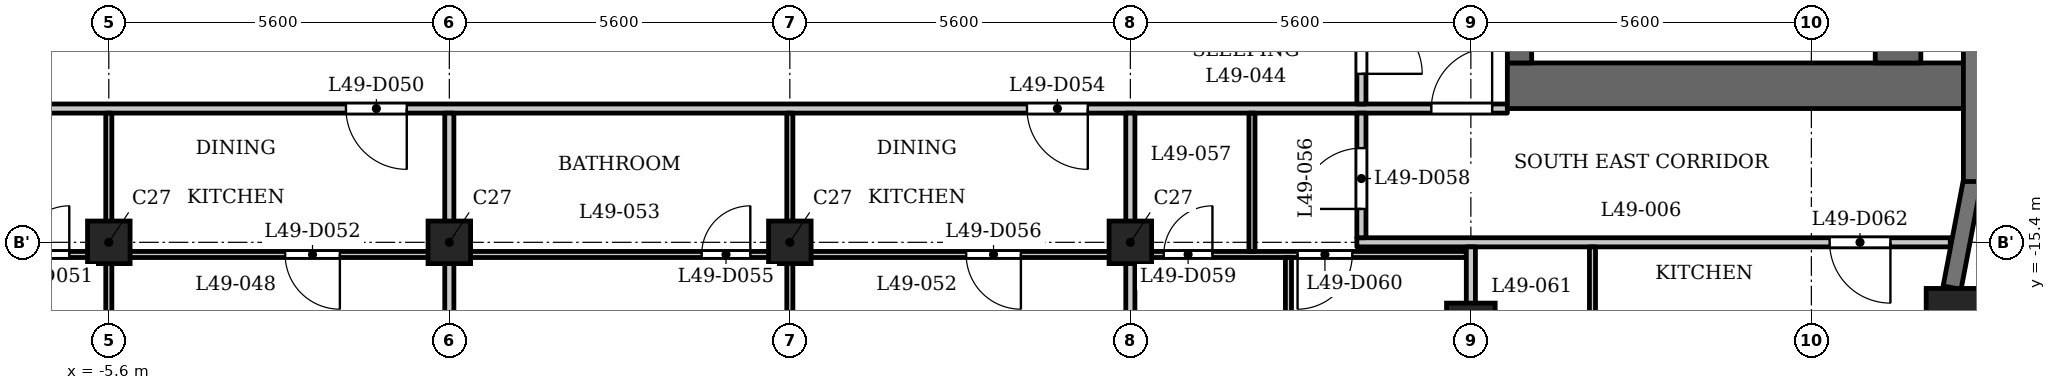
"""IFC4 building model, lengths in metres.
Left out: names, types, materials, properties, quantities, classifications, styles, units other than length and angle.
Written with IfcOpenShell. Run it as: python <this file> out.ifc"""

import sys

from ifc_helpers import new_model, si_unit, direction, frame, frame_2d, origin, origin_2d, place, context, subcontext, project, spatial, rectangle, extrude, element, fill, save


model = new_model("IFC4")
c1 = context("Model", 3, precision=1e-05, world=origin(), true_north=direction((0.0, 1.0)))
c2 = subcontext(c1, "Body", "Model", "MODEL_VIEW")
j1 = project(units=[si_unit("LENGTHUNIT", "METRE"), si_unit("PLANEANGLEUNIT", "RADIAN")], contexts=[c1])
p1 = place(None, origin())
s1 = spatial("IfcSite", under=j1, at=p1, CompositionType="ELEMENT")
p2 = place(p1, origin())
s2 = spatial("IfcBuilding", under=s1, at=p2, CompositionType="ELEMENT")
p3 = place(p2, frame((0.0, 0.0, 192.4)))
s3 = spatial("IfcBuildingStorey", under=s2, at=p3, CompositionType="ELEMENT", Elevation=192.4)
p4 = place(p3, frame((24.738, -16.609, 0.0), z_axis=(0.0, 0.0, 1.0), x_axis=(1.0, 0.0, 0.0)))
e1 = element("IfcColumn", 1, at=p4, inside=s3, PredefinedType="COLUMN", context=c2, shape_type="SweptSolid", body=[
    extrude(rectangle(XDim=0.9, YDim=0.9, at=origin_2d()), origin(), (0.0, 0.0, 1.0), 3.5),
])
p5 = place(p3, frame((16.8, -16.8, 0.0), z_axis=(0.0, 0.0, 1.0), x_axis=(1.0, 0.0, 0.0)))
e2 = element("IfcColumn", 2, at=p5, inside=s3, PredefinedType="COLUMN", context=c2, shape_type="SweptSolid", body=[
    extrude(rectangle(XDim=0.8, YDim=0.8, at=origin_2d()), origin(), (0.0, 0.0, 1.0), 3.5),
])
for number, where, z_axis, x_axis in (
    (3, (-5.6, -15.4, 0.0), (0.0, 0.0, 1.0), (1.0, 0.0, 0.0)),
    (4, (0.0, -15.4, 0.0), (0.0, 0.0, 1.0), (1.0, 0.0, 0.0)),
    (5, (5.6, -15.4, 0.0), (0.0, 0.0, 1.0), (1.0, 0.0, 0.0)),
    (6, (11.2, -15.4, 0.0), (0.0, 0.0, 1.0), (1.0, 0.0, 0.0)),
):
    element("IfcColumn", number, at=place(p3, frame(where, z_axis=z_axis, x_axis=x_axis)), inside=s3, PredefinedType="COLUMN", context=c2, shape_type="SweptSolid", body=[
        extrude(rectangle(XDim=0.7, YDim=0.7, at=origin_2d()), origin(), (0.0, 0.0, 1.0), 3.5),
    ])
p6 = place(p3, frame((24.714, -16.146, 0.0), z_axis=(0.0, 0.0, 1.0), x_axis=(0.187348135549, 0.982293579388, 0.0)))
e7 = element("IfcWall", 7, at=p6, inside=s3, PredefinedType="SOLIDWALL", context=c2, shape_type="SweptSolid", body=[
    extrude(rectangle(XDim=1.806, YDim=0.3, at=frame_2d((0.903, 0.0))), origin(), (0.0, 0.0, 1.0), 2.5),
])
p7 = place(p3, frame((25.05, -14.4, 0.0), z_axis=(0.0, 0.0, 1.0), x_axis=(0.0, 1.0, 0.0)))
e8 = element("IfcWall", 8, at=p7, inside=s3, PredefinedType="SOLIDWALL", context=c2, shape_type="SweptSolid", body=[
    extrude(rectangle(XDim=2.75, YDim=0.3, at=frame_2d((1.375, 0.0))), origin(), (0.0, 0.0, 1.0), 2.5),
])
p8 = place(p3, frame((17.4, -12.825, 0.0), z_axis=(0.0, 0.0, 1.0), x_axis=(1.0, 0.0, 0.0)))
e9 = element("IfcWall", 9, at=p8, inside=s3, PredefinedType="SHEAR", context=c2, shape_type="SweptSolid", body=[
    extrude(rectangle(XDim=7.6, YDim=0.75, at=frame_2d((3.8, 0.0))), origin(), (0.0, 0.0, 1.0), 3.2),
])
p9 = place(p3, frame((17.6, -12.45, 0.0), z_axis=(0.0, 0.0, 1.0), x_axis=(0.0, 1.0, 0.0)))
e10 = element("IfcWall", 10, at=p9, inside=s3, PredefinedType="SHEAR", context=c2, shape_type="SweptSolid", body=[
    extrude(rectangle(XDim=24.9, YDim=0.4, at=frame_2d((12.45, 0.0))), origin(), (0.0, 0.0, 1.0), 3.2),
])
p10 = place(p9, frame((6.325, 0.0, 0.0)))
e11 = element("IfcOpeningElement", 11, at=p10, cuts=e10, PredefinedType="OPENING", context=c2, shape_type="SweptSolid", body=[
    extrude(rectangle(XDim=0.9, YDim=2.1, at=frame_2d((0.45, 1.05))), frame((0.0, 0.21, 0.0), z_axis=(0.0, -1.0, 0.0), x_axis=(1.0, 0.0, 0.0)), (0.0, 0.0, 1.0), 0.42),
])
p11 = place(p9, frame((9.925, 0.0, 0.0)))
e12 = element("IfcOpeningElement", 12, at=p11, cuts=e10, PredefinedType="OPENING", context=c2, shape_type="SweptSolid", body=[
    extrude(rectangle(XDim=0.9, YDim=2.1, at=frame_2d((0.45, 1.05))), frame((0.0, 0.21, 0.0), z_axis=(0.0, -1.0, 0.0), x_axis=(1.0, 0.0, 0.0)), (0.0, 0.0, 1.0), 0.42),
])
p12 = place(p9, frame((15.6, 0.0, 0.0)))
e13 = element("IfcOpeningElement", 13, at=p12, cuts=e10, PredefinedType="OPENING", context=c2, shape_type="SweptSolid", body=[
    extrude(rectangle(XDim=1.1, YDim=2.1, at=frame_2d((0.55, 1.05))), frame((0.0, 0.21, 0.0), z_axis=(0.0, -1.0, 0.0), x_axis=(1.0, 0.0, 0.0)), (0.0, 0.0, 1.0), 0.42),
])
p13 = place(p9, frame((18.0, 0.0, 0.0)))
e14 = element("IfcOpeningElement", 14, at=p13, cuts=e10, PredefinedType="OPENING", context=c2, shape_type="SweptSolid", body=[
    extrude(rectangle(XDim=1.1, YDim=2.1, at=frame_2d((0.55, 1.05))), frame((0.0, 0.21, 0.0), z_axis=(0.0, -1.0, 0.0), x_axis=(1.0, 0.0, 0.0)), (0.0, 0.0, 1.0), 0.42),
])
p14 = place(p9, frame((23.025, 0.0, 0.0)))
e15 = element("IfcOpeningElement", 15, at=p14, cuts=e10, PredefinedType="OPENING", context=c2, shape_type="SweptSolid", body=[
    extrude(rectangle(XDim=1.1, YDim=2.1, at=frame_2d((0.55, 1.05))), frame((0.0, 0.21, 0.0), z_axis=(0.0, -1.0, 0.0), x_axis=(1.0, 0.0, 0.0)), (0.0, 0.0, 1.0), 0.42),
])
p15 = place(p9, frame((0.775, 0.0, 0.0)))
e16 = element("IfcOpeningElement", 16, at=p15, cuts=e10, PredefinedType="OPENING", context=c2, shape_type="SweptSolid", body=[
    extrude(rectangle(XDim=1.1, YDim=2.1, at=frame_2d((0.55, 1.05))), frame((0.0, 0.21, 0.0), z_axis=(0.0, -1.0, 0.0), x_axis=(1.0, 0.0, 0.0)), (0.0, 0.0, 1.0), 0.42),
])
p16 = place(p9, frame((12.925, 0.0, 0.0)))
e17 = element("IfcOpeningElement", 17, at=p16, cuts=e10, PredefinedType="OPENING", context=c2, shape_type="SweptSolid", body=[
    extrude(rectangle(XDim=1.8, YDim=2.1, at=frame_2d((0.9, 1.05))), frame((0.0, 0.21, 0.0), z_axis=(0.0, -1.0, 0.0), x_axis=(1.0, 0.0, 0.0)), (0.0, 0.0, 1.0), 0.42),
])
p17 = place(p3, frame((23.825, -12.45, 0.0), z_axis=(0.0, 0.0, 1.0), x_axis=(0.0, 1.0, 0.0)))
e18 = element("IfcWall", 18, at=p17, inside=s3, PredefinedType="SHEAR", context=c2, shape_type="SweptSolid", body=[
    extrude(rectangle(XDim=24.9, YDim=0.75, at=frame_2d((12.45, 0.0))), origin(), (0.0, 0.0, 1.0), 3.2),
])
p18 = place(p3, frame((-16.725, -15.6, 0.0), z_axis=(0.0, 0.0, 1.0), x_axis=(1.0, 0.0, 0.0)))
e19 = element("IfcWall", 19, at=p18, inside=s3, PredefinedType="PARTITIONING", context=c2, shape_type="SweptSolid", body=[
    extrude(rectangle(XDim=33.45, YDim=0.1, at=frame_2d((16.725, 0.0))), origin(), (0.0, 0.0, 1.0), 3.2),
])
p19 = place(p18, frame((4.075, 0.0, 0.0)))
e20 = element("IfcOpeningElement", 20, at=p19, cuts=e19, PredefinedType="OPENING", context=c2, shape_type="SweptSolid", body=[
    extrude(rectangle(XDim=0.8, YDim=2.1, at=frame_2d((0.4, 1.05))), frame((0.0, 0.06, 0.0), z_axis=(0.0, -1.0, 0.0), x_axis=(1.0, 0.0, 0.0)), (0.0, 0.0, 1.0), 0.12),
])
p20 = place(p18, frame((1.825, 0.0, 0.0)))
e21 = element("IfcOpeningElement", 21, at=p20, cuts=e19, PredefinedType="OPENING", context=c2, shape_type="SweptSolid", body=[
    extrude(rectangle(XDim=0.9, YDim=2.1, at=frame_2d((0.45, 1.05))), frame((0.0, 0.06, 0.0), z_axis=(0.0, -1.0, 0.0), x_axis=(1.0, 0.0, 0.0)), (0.0, 0.0, 1.0), 0.12),
])
p21 = place(p18, frame((9.675, 0.0, 0.0)))
e22 = element("IfcOpeningElement", 22, at=p21, cuts=e19, PredefinedType="OPENING", context=c2, shape_type="SweptSolid", body=[
    extrude(rectangle(XDim=0.8, YDim=2.1, at=frame_2d((0.4, 1.05))), frame((0.0, 0.06, 0.0), z_axis=(0.0, -1.0, 0.0), x_axis=(1.0, 0.0, 0.0)), (0.0, 0.0, 1.0), 0.12),
])
p22 = place(p18, frame((14.025, 0.0, 0.0)))
e23 = element("IfcOpeningElement", 23, at=p22, cuts=e19, PredefinedType="OPENING", context=c2, shape_type="SweptSolid", body=[
    extrude(rectangle(XDim=0.9, YDim=2.1, at=frame_2d((0.45, 1.05))), frame((0.0, 0.06, 0.0), z_axis=(0.0, -1.0, 0.0), x_axis=(1.0, 0.0, 0.0)), (0.0, 0.0, 1.0), 0.12),
])
p23 = place(p18, frame((20.875, 0.0, 0.0)))
e24 = element("IfcOpeningElement", 24, at=p23, cuts=e19, PredefinedType="OPENING", context=c2, shape_type="SweptSolid", body=[
    extrude(rectangle(XDim=0.8, YDim=2.1, at=frame_2d((0.4, 1.05))), frame((0.0, 0.06, 0.0), z_axis=(0.0, -1.0, 0.0), x_axis=(1.0, 0.0, 0.0)), (0.0, 0.0, 1.0), 0.12),
])
p24 = place(p18, frame((25.225, 0.0, 0.0)))
e25 = element("IfcOpeningElement", 25, at=p24, cuts=e19, PredefinedType="OPENING", context=c2, shape_type="SweptSolid", body=[
    extrude(rectangle(XDim=0.9, YDim=2.1, at=frame_2d((0.45, 1.05))), frame((0.0, 0.06, 0.0), z_axis=(0.0, -1.0, 0.0), x_axis=(1.0, 0.0, 0.0)), (0.0, 0.0, 1.0), 0.12),
])
p25 = place(p18, frame((28.475, 0.0, 0.0)))
e26 = element("IfcOpeningElement", 26, at=p25, cuts=e19, PredefinedType="OPENING", context=c2, shape_type="SweptSolid", body=[
    extrude(rectangle(XDim=0.8, YDim=2.1, at=frame_2d((0.4, 1.05))), frame((0.0, 0.06, 0.0), z_axis=(0.0, -1.0, 0.0), x_axis=(1.0, 0.0, 0.0)), (0.0, 0.0, 1.0), 0.12),
])
p26 = place(p18, frame((30.675, 0.0, 0.0)))
e27 = element("IfcOpeningElement", 27, at=p26, cuts=e19, PredefinedType="OPENING", context=c2, shape_type="SweptSolid", body=[
    extrude(rectangle(XDim=0.9, YDim=2.1, at=frame_2d((0.45, 1.05))), frame((0.0, 0.06, 0.0), z_axis=(0.0, -1.0, 0.0), x_axis=(1.0, 0.0, 0.0)), (0.0, 0.0, 1.0), 0.12),
])
p27 = place(p3, frame((14.925, -15.4, 0.0), z_axis=(0.0, 0.0, 1.0), x_axis=(1.0, 0.0, 0.0)))
e28 = element("IfcWall", 28, at=p27, inside=s3, PredefinedType="PARTITIONING", context=c2, shape_type="SweptSolid", body=[
    extrude(rectangle(XDim=9.759, YDim=0.15, at=frame_2d((4.879, 0.0))), origin(), (0.0, 0.0, 1.0), 3.2),
])
p28 = place(p27, frame((7.775, 0.0, 0.0)))
e29 = element("IfcOpeningElement", 29, at=p28, cuts=e28, PredefinedType="OPENING", context=c2, shape_type="SweptSolid", body=[
    extrude(rectangle(XDim=1.0, YDim=2.1, at=frame_2d((0.5, 1.05))), frame((0.0, 0.085, 0.0), z_axis=(0.0, -1.0, 0.0), x_axis=(1.0, 0.0, 0.0)), (0.0, 0.0, 1.0), 0.17),
])
p29 = place(p3, frame((-17.4, -13.2, 0.0), z_axis=(0.0, 0.0, 1.0), x_axis=(1.0, 0.0, 0.0)))
e30 = element("IfcWall", 30, at=p29, inside=s3, PredefinedType="PARTITIONING", context=c2, shape_type="SweptSolid", body=[
    extrude(rectangle(XDim=34.8, YDim=0.15, at=frame_2d((17.4, 0.0))), origin(), (0.0, 0.0, 1.0), 3.2),
])
p30 = place(p29, frame((0.15, 0.0, 0.0)))
e31 = element("IfcOpeningElement", 31, at=p30, cuts=e30, PredefinedType="OPENING", context=c2, shape_type="SweptSolid", body=[
    extrude(rectangle(XDim=1.0, YDim=2.1, at=frame_2d((0.5, 1.05))), frame((0.0, 0.085, 0.0), z_axis=(0.0, -1.0, 0.0), x_axis=(1.0, 0.0, 0.0)), (0.0, 0.0, 1.0), 0.17),
])
p31 = place(p29, frame((33.55, 0.0, 0.0)))
e32 = element("IfcOpeningElement", 32, at=p31, cuts=e30, PredefinedType="OPENING", context=c2, shape_type="SweptSolid", body=[
    extrude(rectangle(XDim=1.0, YDim=2.1, at=frame_2d((0.5, 1.05))), frame((0.0, 0.085, 0.0), z_axis=(0.0, -1.0, 0.0), x_axis=(1.0, 0.0, 0.0)), (0.0, 0.0, 1.0), 0.17),
])
p32 = place(p29, frame((15.7, 0.0, 0.0)))
e33 = element("IfcOpeningElement", 33, at=p32, cuts=e30, PredefinedType="OPENING", context=c2, shape_type="SweptSolid", body=[
    extrude(rectangle(XDim=1.0, YDim=2.1, at=frame_2d((0.5, 1.05))), frame((0.0, 0.085, 0.0), z_axis=(0.0, -1.0, 0.0), x_axis=(1.0, 0.0, 0.0)), (0.0, 0.0, 1.0), 0.17),
])
p33 = place(p29, frame((26.9, 0.0, 0.0)))
e34 = element("IfcOpeningElement", 34, at=p33, cuts=e30, PredefinedType="OPENING", context=c2, shape_type="SweptSolid", body=[
    extrude(rectangle(XDim=1.0, YDim=2.1, at=frame_2d((0.5, 1.05))), frame((0.0, 0.085, 0.0), z_axis=(0.0, -1.0, 0.0), x_axis=(1.0, 0.0, 0.0)), (0.0, 0.0, 1.0), 0.17),
])
p34 = place(p3, frame((-5.6, -22.08, 0.0), z_axis=(0.0, 0.0, 1.0), x_axis=(0.0, 1.0, 0.0)))
e35 = element("IfcWall", 35, at=p34, inside=s3, PredefinedType="PARTITIONING", context=c2, shape_type="SweptSolid", body=[
    extrude(rectangle(XDim=6.43, YDim=0.1, at=frame_2d((3.215, 0.0))), origin(), (0.0, 0.0, 1.0), 3.2),
])
p35 = place(p34, frame((4.18, 0.0, 0.0)))
e36 = element("IfcOpeningElement", 36, at=p35, cuts=e35, PredefinedType="OPENING", context=c2, shape_type="SweptSolid", body=[
    extrude(rectangle(XDim=0.9, YDim=2.1, at=frame_2d((0.45, 1.05))), frame((0.0, 0.06, 0.0), z_axis=(0.0, -1.0, 0.0), x_axis=(1.0, 0.0, 0.0)), (0.0, 0.0, 1.0), 0.12),
])
p36 = place(p3, frame((-5.6, -15.55, 0.0), z_axis=(0.0, 0.0, 1.0), x_axis=(0.0, 1.0, 0.0)))
e37 = element("IfcWall", 37, at=p36, inside=s3, PredefinedType="PARTITIONING", context=c2, shape_type="SweptSolid", body=[
    extrude(rectangle(XDim=2.275, YDim=0.1, at=frame_2d((1.138, 0.0))), origin(), (0.0, 0.0, 1.0), 3.2),
])
p37 = place(p3, frame((0.0, -22.08, 0.0), z_axis=(0.0, 0.0, 1.0), x_axis=(0.0, 1.0, 0.0)))
e38 = element("IfcWall", 38, at=p37, inside=s3, PredefinedType="PARTITIONING", context=c2, shape_type="SweptSolid", body=[
    extrude(rectangle(XDim=6.43, YDim=0.15, at=frame_2d((3.215, 0.0))), origin(), (0.0, 0.0, 1.0), 3.2),
])
p38 = place(p3, frame((0.0, -15.55, 0.0), z_axis=(0.0, 0.0, 1.0), x_axis=(0.0, 1.0, 0.0)))
e39 = element("IfcWall", 39, at=p38, inside=s3, PredefinedType="PARTITIONING", context=c2, shape_type="SweptSolid", body=[
    extrude(rectangle(XDim=2.275, YDim=0.15, at=frame_2d((1.138, 0.0))), origin(), (0.0, 0.0, 1.0), 3.2),
])
p39 = place(p3, frame((5.6, -22.08, 0.0), z_axis=(0.0, 0.0, 1.0), x_axis=(0.0, 1.0, 0.0)))
e40 = element("IfcWall", 40, at=p39, inside=s3, PredefinedType="PARTITIONING", context=c2, shape_type="SweptSolid", body=[
    extrude(rectangle(XDim=6.43, YDim=0.1, at=frame_2d((3.215, 0.0))), origin(), (0.0, 0.0, 1.0), 3.2),
])
p40 = place(p39, frame((4.18, 0.0, 0.0)))
e41 = element("IfcOpeningElement", 41, at=p40, cuts=e40, PredefinedType="OPENING", context=c2, shape_type="SweptSolid", body=[
    extrude(rectangle(XDim=0.9, YDim=2.1, at=frame_2d((0.45, 1.05))), frame((0.0, 0.06, 0.0), z_axis=(0.0, -1.0, 0.0), x_axis=(1.0, 0.0, 0.0)), (0.0, 0.0, 1.0), 0.12),
])
p41 = place(p3, frame((5.6, -15.55, 0.0), z_axis=(0.0, 0.0, 1.0), x_axis=(0.0, 1.0, 0.0)))
e42 = element("IfcWall", 42, at=p41, inside=s3, PredefinedType="PARTITIONING", context=c2, shape_type="SweptSolid", body=[
    extrude(rectangle(XDim=2.275, YDim=0.1, at=frame_2d((1.138, 0.0))), origin(), (0.0, 0.0, 1.0), 3.2),
])
p42 = place(p3, frame((11.2, -22.08, 0.0), z_axis=(0.0, 0.0, 1.0), x_axis=(0.0, 1.0, 0.0)))
e43 = element("IfcWall", 43, at=p42, inside=s3, PredefinedType="PARTITIONING", context=c2, shape_type="SweptSolid", body=[
    extrude(rectangle(XDim=6.43, YDim=0.15, at=frame_2d((3.215, 0.0))), origin(), (0.0, 0.0, 1.0), 3.2),
])
p43 = place(p3, frame((11.2, -15.55, 0.0), z_axis=(0.0, 0.0, 1.0), x_axis=(0.0, 1.0, 0.0)))
e44 = element("IfcWall", 44, at=p43, inside=s3, PredefinedType="PARTITIONING", context=c2, shape_type="SweptSolid", body=[
    extrude(rectangle(XDim=2.275, YDim=0.15, at=frame_2d((1.138, 0.0))), origin(), (0.0, 0.0, 1.0), 3.2),
])
p44 = place(p3, frame((13.2, -15.55, 0.0), z_axis=(0.0, 0.0, 1.0), x_axis=(0.0, 1.0, 0.0)))
e45 = element("IfcWall", 45, at=p44, inside=s3, PredefinedType="PARTITIONING", context=c2, shape_type="SweptSolid", body=[
    extrude(rectangle(XDim=2.275, YDim=0.1, at=frame_2d((1.138, 0.0))), origin(), (0.0, 0.0, 1.0), 3.2),
])
p45 = place(p3, frame((13.8, -22.83, 0.0), z_axis=(0.0, 0.0, 1.0), x_axis=(0.0, 1.0, 0.0)))
e46 = element("IfcWall", 46, at=p45, inside=s3, PredefinedType="PARTITIONING", context=c2, shape_type="SweptSolid", body=[
    extrude(rectangle(XDim=7.18, YDim=0.1, at=frame_2d((3.59, 0.0))), origin(), (0.0, 0.0, 1.0), 3.2),
])
p46 = place(p45, frame((5.18, 0.0, 0.0)))
e47 = element("IfcOpeningElement", 47, at=p46, cuts=e46, PredefinedType="OPENING", context=c2, shape_type="SweptSolid", body=[
    extrude(rectangle(XDim=0.9, YDim=2.1, at=frame_2d((0.45, 1.05))), frame((0.0, 0.06, 0.0), z_axis=(0.0, -1.0, 0.0), x_axis=(1.0, 0.0, 0.0)), (0.0, 0.0, 1.0), 0.12),
])
p47 = place(p3, frame((15.0, -15.325, 0.0), z_axis=(0.0, 0.0, 1.0), x_axis=(0.0, 1.0, 0.0)))
e48 = element("IfcWall", 48, at=p47, inside=s3, PredefinedType="PARTITIONING", context=c2, shape_type="SweptSolid", body=[
    extrude(rectangle(XDim=2.05, YDim=0.15, at=frame_2d((1.025, 0.0))), origin(), (0.0, 0.0, 1.0), 3.2),
])
p48 = place(p47, frame((0.474, 0.0, 0.0)))
e49 = element("IfcOpeningElement", 49, at=p48, cuts=e48, PredefinedType="OPENING", context=c2, shape_type="SweptSolid", body=[
    extrude(rectangle(XDim=1.0, YDim=2.1, at=frame_2d((0.5, 1.05))), frame((0.0, 0.085, 0.0), z_axis=(0.0, -1.0, 0.0), x_axis=(1.0, 0.0, 0.0)), (0.0, 0.0, 1.0), 0.17),
])
p49 = place(p3, frame((15.0, -13.125, 0.0), z_axis=(0.0, 0.0, 1.0), x_axis=(0.0, 1.0, 0.0)))
e50 = element("IfcWall", 50, at=p49, inside=s3, PredefinedType="PARTITIONING", context=c2, shape_type="SweptSolid", body=[
    extrude(rectangle(XDim=6.356, YDim=0.15, at=frame_2d((3.178, 0.0))), origin(), (0.0, 0.0, 1.0), 3.2),
])
p50 = place(p49, frame((0.496, 0.0, 0.0)))
e51 = element("IfcOpeningElement", 51, at=p50, cuts=e50, PredefinedType="OPENING", context=c2, shape_type="SweptSolid", body=[
    extrude(rectangle(XDim=1.0, YDim=2.1, at=frame_2d((0.5, 1.05))), frame((0.0, 0.085, 0.0), z_axis=(0.0, -1.0, 0.0), x_axis=(1.0, 0.0, 0.0)), (0.0, 0.0, 1.0), 0.17),
])
p51 = place(p3, frame((16.8, -22.31, 0.0), z_axis=(0.0, 0.0, 1.0), x_axis=(0.0, 1.0, 0.0)))
e52 = element("IfcWall", 52, at=p51, inside=s3, PredefinedType="PARTITIONING", context=c2, shape_type="SweptSolid", body=[
    extrude(rectangle(XDim=6.835, YDim=0.15, at=frame_2d((3.417, 0.0))), origin(), (0.0, 0.0, 1.0), 2.55),
])
p52 = place(p3, frame((18.8, -18.05, 0.0), z_axis=(0.0, 0.0, 1.0), x_axis=(0.0, 1.0, 0.0)))
e53 = element("IfcWall", 53, at=p52, inside=s3, PredefinedType="PARTITIONING", context=c2, shape_type="SweptSolid", body=[
    extrude(rectangle(XDim=2.575, YDim=0.1, at=frame_2d((1.288, 0.0))), origin(), (0.0, 0.0, 1.0), 3.2),
])
p53 = place(p50, origin())
e54 = element("IfcDoor", 54, at=p53, inside=s3, OperationType="SINGLE_SWING_LEFT", PredefinedType="DOOR", context=c2, shape_type="SweptSolid", body=[
    extrude(rectangle(XDim=1.0, YDim=2.1, at=frame_2d((0.5, 1.05))), frame((0.0, 0.025, 0.0), z_axis=(0.0, -1.0, 0.0), x_axis=(1.0, 0.0, 0.0)), (0.0, 0.0, 1.0), 0.05),
])
fill(e51, e54)
p54 = place(p31, origin())
e55 = element("IfcDoor", 55, at=p54, inside=s3, OperationType="SINGLE_SWING_LEFT", PredefinedType="DOOR", context=c2, shape_type="SweptSolid", body=[
    extrude(rectangle(XDim=1.0, YDim=2.1, at=frame_2d((0.5, 1.05))), frame((0.0, 0.025, 0.0), z_axis=(0.0, -1.0, 0.0), x_axis=(1.0, 0.0, 0.0)), (0.0, 0.0, 1.0), 0.05),
])
fill(e32, e55)
p55 = place(p32, origin())
e56 = element("IfcDoor", 56, at=p55, inside=s3, OperationType="SINGLE_SWING_RIGHT", PredefinedType="DOOR", context=c2, shape_type="SweptSolid", body=[
    extrude(rectangle(XDim=1.0, YDim=2.1, at=frame_2d((0.5, 1.05))), frame((0.0, 0.025, 0.0), z_axis=(0.0, -1.0, 0.0), x_axis=(1.0, 0.0, 0.0)), (0.0, 0.0, 1.0), 0.05),
])
fill(e33, e56)
p56 = place(p21, origin())
e57 = element("IfcDoor", 57, at=p56, inside=s3, OperationType="SINGLE_SWING_LEFT", PredefinedType="DOOR", context=c2, shape_type="SweptSolid", body=[
    extrude(rectangle(XDim=0.8, YDim=2.1, at=frame_2d((0.4, 1.05))), frame((0.0, 0.025, 0.0), z_axis=(0.0, -1.0, 0.0), x_axis=(1.0, 0.0, 0.0)), (0.0, 0.0, 1.0), 0.05),
])
fill(e22, e57)
p57 = place(p22, origin())
e58 = element("IfcDoor", 58, at=p57, inside=s3, OperationType="SINGLE_SWING_RIGHT", PredefinedType="DOOR", context=c2, shape_type="SweptSolid", body=[
    extrude(rectangle(XDim=0.9, YDim=2.1, at=frame_2d((0.45, 1.05))), frame((0.0, 0.025, 0.0), z_axis=(0.0, -1.0, 0.0), x_axis=(1.0, 0.0, 0.0)), (0.0, 0.0, 1.0), 0.05),
])
fill(e23, e58)
p58 = place(p33, origin())
e59 = element("IfcDoor", 59, at=p58, inside=s3, OperationType="SINGLE_SWING_RIGHT", PredefinedType="DOOR", context=c2, shape_type="SweptSolid", body=[
    extrude(rectangle(XDim=1.0, YDim=2.1, at=frame_2d((0.5, 1.05))), frame((0.0, 0.025, 0.0), z_axis=(0.0, -1.0, 0.0), x_axis=(1.0, 0.0, 0.0)), (0.0, 0.0, 1.0), 0.05),
])
fill(e34, e59)
p59 = place(p23, origin())
e60 = element("IfcDoor", 60, at=p59, inside=s3, OperationType="SINGLE_SWING_LEFT", PredefinedType="DOOR", context=c2, shape_type="SweptSolid", body=[
    extrude(rectangle(XDim=0.8, YDim=2.1, at=frame_2d((0.4, 1.05))), frame((0.0, 0.025, 0.0), z_axis=(0.0, -1.0, 0.0), x_axis=(1.0, 0.0, 0.0)), (0.0, 0.0, 1.0), 0.05),
])
fill(e24, e60)
p60 = place(p24, origin())
e61 = element("IfcDoor", 61, at=p60, inside=s3, OperationType="SINGLE_SWING_RIGHT", PredefinedType="DOOR", context=c2, shape_type="SweptSolid", body=[
    extrude(rectangle(XDim=0.9, YDim=2.1, at=frame_2d((0.45, 1.05))), frame((0.0, 0.025, 0.0), z_axis=(0.0, -1.0, 0.0), x_axis=(1.0, 0.0, 0.0)), (0.0, 0.0, 1.0), 0.05),
])
fill(e25, e61)
p61 = place(p48, origin())
e62 = element("IfcDoor", 62, at=p61, inside=s3, OperationType="SINGLE_SWING_RIGHT", PredefinedType="DOOR", context=c2, shape_type="SweptSolid", body=[
    extrude(rectangle(XDim=1.0, YDim=2.1, at=frame_2d((0.5, 1.05))), frame((0.0, 0.025, 0.0), z_axis=(0.0, -1.0, 0.0), x_axis=(1.0, 0.0, 0.0)), (0.0, 0.0, 1.0), 0.05),
])
fill(e49, e62)
p62 = place(p25, origin())
e63 = element("IfcDoor", 63, at=p62, inside=s3, OperationType="SINGLE_SWING_LEFT", PredefinedType="DOOR", context=c2, shape_type="SweptSolid", body=[
    extrude(rectangle(XDim=0.8, YDim=2.1, at=frame_2d((0.4, 1.05))), frame((0.0, 0.025, 0.0), z_axis=(0.0, -1.0, 0.0), x_axis=(1.0, 0.0, 0.0)), (0.0, 0.0, 1.0), 0.05),
])
fill(e26, e63)
p63 = place(p26, origin())
e64 = element("IfcDoor", 64, at=p63, inside=s3, OperationType="SINGLE_SWING_LEFT", PredefinedType="DOOR", context=c2, shape_type="SweptSolid", body=[
    extrude(rectangle(XDim=0.9, YDim=2.1, at=frame_2d((0.45, 1.05))), frame((0.0, 0.025, 0.0), z_axis=(0.0, -1.0, 0.0), x_axis=(1.0, 0.0, 0.0)), (0.0, 0.0, 1.0), 0.05),
])
fill(e27, e64)
p64 = place(p28, origin())
e65 = element("IfcDoor", 65, at=p64, inside=s3, OperationType="SINGLE_SWING_RIGHT", PredefinedType="DOOR", context=c2, shape_type="SweptSolid", body=[
    extrude(rectangle(XDim=1.0, YDim=2.1, at=frame_2d((0.5, 1.05))), frame((0.0, 0.025, 0.0), z_axis=(0.0, -1.0, 0.0), x_axis=(1.0, 0.0, 0.0)), (0.0, 0.0, 1.0), 0.05),
])
fill(e29, e65)
save(model, sys.argv[1])
